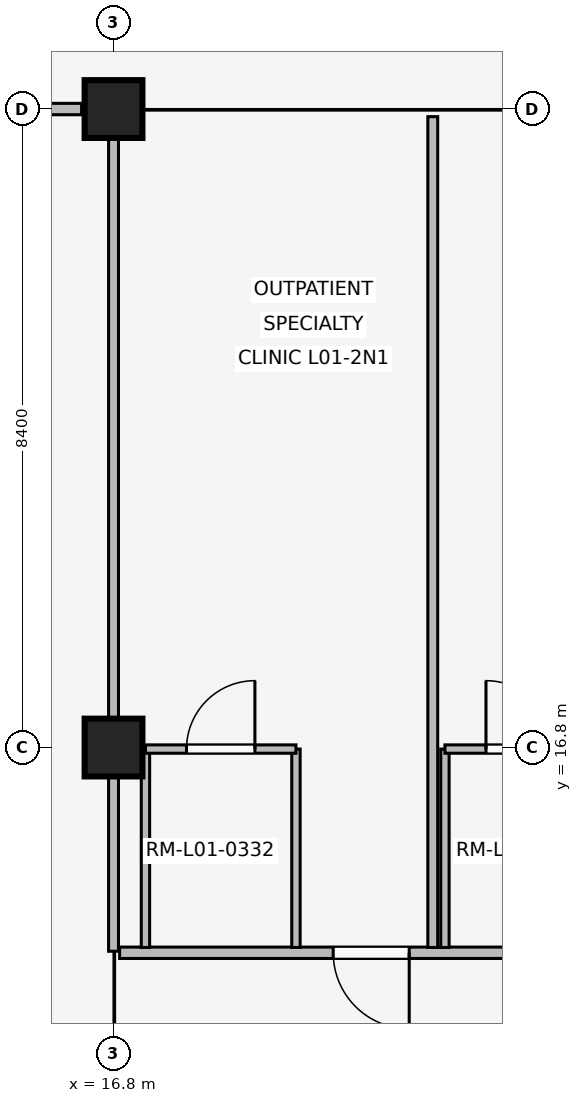
"""IFC4 building model, lengths in metres.
Left out: names, types, materials, properties, quantities, classifications, styles, units other than length and angle.
Written with IfcOpenShell. Run it as: python <this file> out.ifc"""

import sys

from ifc_helpers import new_model, si_unit, direction, frame, frame_2d, origin, origin_2d, place, context, subcontext, project, spatial, rectangle, extrude, element, fill, save


model = new_model("IFC4")
c1 = context("Model", 3, precision=1e-05, world=origin(), true_north=direction((0.0, 1.0)))
c2 = subcontext(c1, "Body", "Model", "MODEL_VIEW")
j1 = project(units=[si_unit("LENGTHUNIT", "METRE"), si_unit("PLANEANGLEUNIT", "RADIAN")], contexts=[c1])
p1 = place(None, origin())
s1 = spatial("IfcSite", under=j1, at=p1, CompositionType="ELEMENT")
p2 = place(p1, origin())
s2 = spatial("IfcBuilding", under=s1, at=p2, CompositionType="ELEMENT")
p3 = place(p2, frame((0.0, 0.0, 4.8)))
s3 = spatial("IfcBuildingStorey", under=s2, at=p3, CompositionType="ELEMENT", Elevation=4.8)
for number, where, z_axis, x_axis in (
    (1, (16.8, 16.8, 0.0), (0.0, 0.0, 1.0), (1.0, 0.0, 0.0)),
    (2, (16.8, 25.2, 0.0), (0.0, 0.0, 1.0), (1.0, 0.0, 0.0)),
):
    element("IfcColumn", number, at=place(p3, frame(where, z_axis=z_axis, x_axis=x_axis)), inside=s3, PredefinedType="COLUMN", context=c2, shape_type="SweptSolid", body=[
        extrude(rectangle(XDim=0.76, YDim=0.76, at=origin_2d()), origin(), (0.0, 0.0, 1.0), 3.3),
    ])
p4 = place(p3, frame((16.8, 14.12, 0.0), z_axis=(0.0, 0.0, 1.0), x_axis=(0.0, 1.0, 0.0)))
e3 = element("IfcWall", 3, at=p4, inside=s3, PredefinedType="PARTITIONING", context=c2, shape_type="SweptSolid", body=[
    extrude(rectangle(XDim=10.94, YDim=0.13, at=frame_2d((5.47, 0.0))), origin(), (0.0, 0.0, 1.0), 2.4),
])
p5 = place(p3, frame((25.12, 14.1, 0.0), z_axis=(0.0, 0.0, 1.0), x_axis=(-1.0, 0.0, 0.0)))
e4 = element("IfcWall", 4, at=p5, inside=s3, PredefinedType="PARTITIONING", context=c2, shape_type="SweptSolid", body=[
    extrude(rectangle(XDim=8.24, YDim=0.15, at=frame_2d((4.12, 0.0))), origin(), (0.0, 0.0, 1.0), 2.4),
])
p6 = place(p5, frame((0.73, 0.0, 0.0)))
e5 = element("IfcOpeningElement", 5, at=p6, cuts=e4, PredefinedType="OPENING", context=c2, shape_type="SweptSolid", body=[
    extrude(rectangle(XDim=1.0, YDim=2.15, at=frame_2d((0.5, 1.075))), frame((0.0, 0.085, 0.0), z_axis=(0.0, -1.0, 0.0), x_axis=(1.0, 0.0, 0.0)), (0.0, 0.0, 1.0), 0.17),
])
p7 = place(p5, frame((4.43, 0.0, 0.0)))
e6 = element("IfcOpeningElement", 6, at=p7, cuts=e4, PredefinedType="OPENING", context=c2, shape_type="SweptSolid", body=[
    extrude(rectangle(XDim=1.0, YDim=2.15, at=frame_2d((0.5, 1.075))), frame((0.0, 0.085, 0.0), z_axis=(0.0, -1.0, 0.0), x_axis=(1.0, 0.0, 0.0)), (0.0, 0.0, 1.0), 0.17),
])
p8 = place(p3, frame((21.0, 14.17, 0.0), z_axis=(0.0, 0.0, 1.0), x_axis=(0.0, 1.0, 0.0)))
e7 = element("IfcWall", 7, at=p8, inside=s3, PredefinedType="PARTITIONING", context=c2, shape_type="SweptSolid", body=[
    extrude(rectangle(XDim=10.93, YDim=0.13, at=frame_2d((5.465, 0.0))), origin(), (0.0, 0.0, 1.0), 2.4),
])
for number, where, z_axis, x_axis in (
    (8, (17.22, 14.17, 0.0), (0.0, 0.0, 1.0), (0.0, 1.0, 0.0)),
    (9, (19.2, 14.17, 0.0), (0.0, 0.0, 1.0), (0.0, 1.0, 0.0)),
):
    element("IfcWall", number, at=place(p3, frame(where, z_axis=z_axis, x_axis=x_axis)), inside=s3, PredefinedType="PARTITIONING", context=c2, shape_type="SweptSolid", body=[
        extrude(rectangle(XDim=2.61, YDim=0.11, at=frame_2d((1.305, 0.0))), origin(), (0.0, 0.0, 1.0), 2.4),
    ])
p9 = place(p3, frame((17.22, 16.78, 0.0), z_axis=(0.0, 0.0, 1.0), x_axis=(1.0, 0.0, 0.0)))
e10 = element("IfcWall", 10, at=p9, inside=s3, PredefinedType="PARTITIONING", context=c2, shape_type="SweptSolid", body=[
    extrude(rectangle(XDim=1.98, YDim=0.11, at=frame_2d((0.99, 0.0))), origin(), (0.0, 0.0, 1.0), 2.4),
])
p10 = place(p9, frame((0.54, 0.0, 0.0)))
e11 = element("IfcOpeningElement", 11, at=p10, cuts=e10, PredefinedType="OPENING", context=c2, shape_type="SweptSolid", body=[
    extrude(rectangle(XDim=0.9, YDim=2.1, at=frame_2d((0.45, 1.05))), frame((0.0, 0.065, 0.0), z_axis=(0.0, -1.0, 0.0), x_axis=(1.0, 0.0, 0.0)), (0.0, 0.0, 1.0), 0.13),
])
p11 = place(p3, frame((21.16, 14.17, 0.0), z_axis=(0.0, 0.0, 1.0), x_axis=(0.0, 1.0, 0.0)))
e12 = element("IfcWall", 12, at=p11, inside=s3, PredefinedType="PARTITIONING", context=c2, shape_type="SweptSolid", body=[
    extrude(rectangle(XDim=2.61, YDim=0.11, at=frame_2d((1.305, 0.0))), origin(), (0.0, 0.0, 1.0), 2.4),
])
p12 = place(p3, frame((21.16, 16.78, 0.0), z_axis=(0.0, 0.0, 1.0), x_axis=(1.0, 0.0, 0.0)))
e13 = element("IfcWall", 13, at=p12, inside=s3, PredefinedType="PARTITIONING", context=c2, shape_type="SweptSolid", body=[
    extrude(rectangle(XDim=1.98, YDim=0.11, at=frame_2d((0.99, 0.0))), origin(), (0.0, 0.0, 1.0), 2.4),
])
p13 = place(p12, frame((0.54, 0.0, 0.0)))
e14 = element("IfcOpeningElement", 14, at=p13, cuts=e13, PredefinedType="OPENING", context=c2, shape_type="SweptSolid", body=[
    extrude(rectangle(XDim=0.9, YDim=2.1, at=frame_2d((0.45, 1.05))), frame((0.0, 0.065, 0.0), z_axis=(0.0, -1.0, 0.0), x_axis=(1.0, 0.0, 0.0)), (0.0, 0.0, 1.0), 0.13),
])
p14 = place(p3, frame((0.42, 25.2, 0.0), z_axis=(0.0, 0.0, 1.0), x_axis=(1.0, 0.0, 0.0)))
e15 = element("IfcWall", 15, at=p14, inside=s3, PredefinedType="PARTITIONING", context=c2, shape_type="SweptSolid", body=[
    extrude(rectangle(XDim=15.96, YDim=0.15, at=frame_2d((7.98, 0.0))), origin(), (0.0, 0.0, 1.0), 2.4),
])
p15 = place(p14, frame((3.4, 0.0, 0.0)))
e16 = element("IfcOpeningElement", 16, at=p15, cuts=e15, PredefinedType="OPENING", context=c2, shape_type="SweptSolid", body=[
    extrude(rectangle(XDim=1.4, YDim=2.25, at=frame_2d((0.7, 1.125))), frame((0.0, 0.085, 0.0), z_axis=(0.0, -1.0, 0.0), x_axis=(1.0, 0.0, 0.0)), (0.0, 0.0, 1.0), 0.17),
])
p16 = place(p7, origin())
e17 = element("IfcDoor", 17, at=p16, inside=s3, OperationType="SINGLE_SWING_LEFT", PredefinedType="DOOR", context=c2, shape_type="SweptSolid", body=[
    extrude(rectangle(XDim=1.0, YDim=2.15, at=frame_2d((0.5, 1.075))), frame((0.0, 0.025, 0.0), z_axis=(0.0, -1.0, 0.0), x_axis=(1.0, 0.0, 0.0)), (0.0, 0.0, 1.0), 0.05),
])
fill(e6, e17)
p17 = place(p10, origin())
e18 = element("IfcDoor", 18, at=p17, inside=s3, OperationType="SINGLE_SWING_RIGHT", PredefinedType="DOOR", context=c2, shape_type="SweptSolid", body=[
    extrude(rectangle(XDim=0.9, YDim=2.1, at=frame_2d((0.45, 1.05))), frame((0.0, 0.025, 0.0), z_axis=(0.0, -1.0, 0.0), x_axis=(1.0, 0.0, 0.0)), (0.0, 0.0, 1.0), 0.05),
])
fill(e11, e18)
p18 = place(p13, origin())
e19 = element("IfcDoor", 19, at=p18, inside=s3, OperationType="SINGLE_SWING_LEFT", PredefinedType="DOOR", context=c2, shape_type="SweptSolid", body=[
    extrude(rectangle(XDim=0.9, YDim=2.1, at=frame_2d((0.45, 1.05))), frame((0.0, 0.025, 0.0), z_axis=(0.0, -1.0, 0.0), x_axis=(1.0, 0.0, 0.0)), (0.0, 0.0, 1.0), 0.05),
])
fill(e14, e19)
save(model, sys.argv[1])
